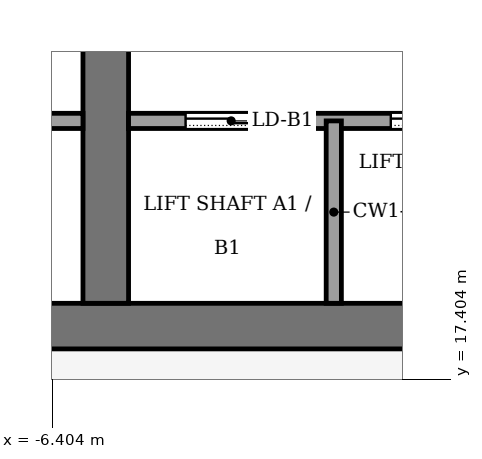
"""IFC4 building model, lengths in metres.
Left out: names, types, materials, properties, quantities, classifications, styles, units other than length and angle.
Written with IfcOpenShell. Run it as: python <this file> out.ifc"""

import sys

from ifc_helpers import new_model, si_unit, direction, frame, frame_2d, origin, place, context, subcontext, project, spatial, rectangle, extrude, element, fill, save


model = new_model("IFC4")
c1 = context("Model", 3, precision=1e-05, world=origin(), true_north=direction((0.0, 1.0)))
c2 = subcontext(c1, "Body", "Model", "MODEL_VIEW")
j1 = project(units=[si_unit("LENGTHUNIT", "METRE"), si_unit("PLANEANGLEUNIT", "RADIAN")], contexts=[c1])
p1 = place(None, origin())
s1 = spatial("IfcSite", under=j1, at=p1, CompositionType="ELEMENT")
p2 = place(p1, origin())
s2 = spatial("IfcBuilding", under=s1, at=p2, CompositionType="ELEMENT")
p3 = place(p2, frame((0.0, 0.0, 294.0)))
s3 = spatial("IfcBuildingStorey", under=s2, at=p3, CompositionType="ELEMENT", Elevation=294.0)
p4 = place(p3, frame((-13.2, 18.1, -0.13), z_axis=(0.0, 0.0, 1.0), x_axis=(1.0, 0.0, 0.0)))
e1 = element("IfcWall", 1, at=p4, inside=s3, PredefinedType="SHEAR", context=c2, shape_type="SweptSolid", body=[
    extrude(rectangle(XDim=26.4, YDim=0.6, at=frame_2d((13.2, 0.0))), origin(), (0.0, 0.0, 1.0), 4.0),
])
p5 = place(p3, frame((-5.7, 18.4, -0.13), z_axis=(0.0, 0.0, 1.0), x_axis=(0.0, 1.0, 0.0)))
e2 = element("IfcWall", 2, at=p5, inside=s3, PredefinedType="SHEAR", context=c2, shape_type="SweptSolid", body=[
    extrude(rectangle(XDim=19.2, YDim=0.6, at=frame_2d((9.6, 0.0))), origin(), (0.0, 0.0, 1.0), 4.0),
])
p6 = place(p5, frame((8.35, 0.0, 0.13)))
e3 = element("IfcOpeningElement", 3, at=p6, cuts=e2, PredefinedType="OPENING", context=c2, shape_type="SweptSolid", body=[
    extrude(rectangle(XDim=0.9, YDim=2.1, at=frame_2d((0.45, 1.05))), frame((0.0, 0.31, 0.0), z_axis=(0.0, -1.0, 0.0), x_axis=(1.0, 0.0, 0.0)), (0.0, 0.0, 1.0), 0.62),
])
p7 = place(p3, frame((-12.6, 20.8, 0.0), z_axis=(0.0, 0.0, 1.0), x_axis=(1.0, 0.0, 0.0)))
e4 = element("IfcWall", 4, at=p7, inside=s3, PredefinedType="PARTITIONING", context=c2, shape_type="SweptSolid", body=[
    extrude(rectangle(XDim=6.6, YDim=0.2, at=frame_2d((3.3, 0.0))), origin(), (0.0, 0.0, 1.0), 3.87),
])
p8 = place(p7, frame((0.49, 0.0, 0.0)))
e5 = element("IfcOpeningElement", 5, at=p8, cuts=e4, PredefinedType="OPENING", context=c2, shape_type="SweptSolid", body=[
    extrude(rectangle(XDim=1.0, YDim=2.1, at=frame_2d((0.5, 1.05))), frame((0.0, 0.11, 0.0), z_axis=(0.0, -1.0, 0.0), x_axis=(1.0, 0.0, 0.0)), (0.0, 0.0, 1.0), 0.22),
])
p9 = place(p7, frame((3.79, 0.0, 0.0)))
e6 = element("IfcOpeningElement", 6, at=p9, cuts=e4, PredefinedType="OPENING", context=c2, shape_type="SweptSolid", body=[
    extrude(rectangle(XDim=1.0, YDim=2.1, at=frame_2d((0.5, 1.05))), frame((0.0, 0.11, 0.0), z_axis=(0.0, -1.0, 0.0), x_axis=(1.0, 0.0, 0.0)), (0.0, 0.0, 1.0), 0.22),
])
p10 = place(p3, frame((-5.4, 20.8, 0.0), z_axis=(0.0, 0.0, 1.0), x_axis=(1.0, 0.0, 0.0)))
e7 = element("IfcWall", 7, at=p10, inside=s3, PredefinedType="PARTITIONING", context=c2, shape_type="SweptSolid", body=[
    extrude(rectangle(XDim=10.8, YDim=0.2, at=frame_2d((5.4, 0.0))), origin(), (0.0, 0.0, 1.0), 3.87),
])
p11 = place(p10, frame((0.75, 0.0, 0.0)))
e8 = element("IfcOpeningElement", 8, at=p11, cuts=e7, PredefinedType="OPENING", context=c2, shape_type="SweptSolid", body=[
    extrude(rectangle(XDim=1.2, YDim=2.2, at=frame_2d((0.6, 1.1))), frame((0.0, 0.11, 0.0), z_axis=(0.0, -1.0, 0.0), x_axis=(1.0, 0.0, 0.0)), (0.0, 0.0, 1.0), 0.22),
])
p12 = place(p10, frame((3.45, 0.0, 0.0)))
e9 = element("IfcOpeningElement", 9, at=p12, cuts=e7, PredefinedType="OPENING", context=c2, shape_type="SweptSolid", body=[
    extrude(rectangle(XDim=1.2, YDim=2.2, at=frame_2d((0.6, 1.1))), frame((0.0, 0.11, 0.0), z_axis=(0.0, -1.0, 0.0), x_axis=(1.0, 0.0, 0.0)), (0.0, 0.0, 1.0), 0.22),
])
p13 = place(p10, frame((6.15, 0.0, 0.0)))
e10 = element("IfcOpeningElement", 10, at=p13, cuts=e7, PredefinedType="OPENING", context=c2, shape_type="SweptSolid", body=[
    extrude(rectangle(XDim=1.2, YDim=2.2, at=frame_2d((0.6, 1.1))), frame((0.0, 0.11, 0.0), z_axis=(0.0, -1.0, 0.0), x_axis=(1.0, 0.0, 0.0)), (0.0, 0.0, 1.0), 0.22),
])
p14 = place(p10, frame((8.85, 0.0, 0.0)))
e11 = element("IfcOpeningElement", 11, at=p14, cuts=e7, PredefinedType="OPENING", context=c2, shape_type="SweptSolid", body=[
    extrude(rectangle(XDim=1.2, YDim=2.2, at=frame_2d((0.6, 1.1))), frame((0.0, 0.11, 0.0), z_axis=(0.0, -1.0, 0.0), x_axis=(1.0, 0.0, 0.0)), (0.0, 0.0, 1.0), 0.22),
])
p15 = place(p3, frame((-2.7, 18.4, 0.0), z_axis=(0.0, 0.0, 1.0), x_axis=(0.0, 1.0, 0.0)))
e12 = element("IfcWall", 12, at=p15, inside=s3, PredefinedType="PARTITIONING", context=c2, shape_type="SweptSolid", body=[
    extrude(rectangle(XDim=2.4, YDim=0.2, at=frame_2d((1.2, 0.0))), origin(), (0.0, 0.0, 1.0), 3.87),
])
p16 = place(p11, origin())
e13 = element("IfcDoor", 13, at=p16, inside=s3, OperationType="SLIDING_TO_LEFT", PredefinedType="DOOR", context=c2, shape_type="SweptSolid", body=[
    extrude(rectangle(XDim=1.2, YDim=2.2, at=frame_2d((0.6, 1.1))), frame((0.0, 0.025, 0.0), z_axis=(0.0, -1.0, 0.0), x_axis=(1.0, 0.0, 0.0)), (0.0, 0.0, 1.0), 0.05),
])
fill(e8, e13)
p17 = place(p12, origin())
e14 = element("IfcDoor", 14, at=p17, inside=s3, OperationType="SLIDING_TO_LEFT", PredefinedType="DOOR", context=c2, shape_type="SweptSolid", body=[
    extrude(rectangle(XDim=1.2, YDim=2.2, at=frame_2d((0.6, 1.1))), frame((0.0, 0.025, 0.0), z_axis=(0.0, -1.0, 0.0), x_axis=(1.0, 0.0, 0.0)), (0.0, 0.0, 1.0), 0.05),
])
fill(e9, e14)
save(model, sys.argv[1])
